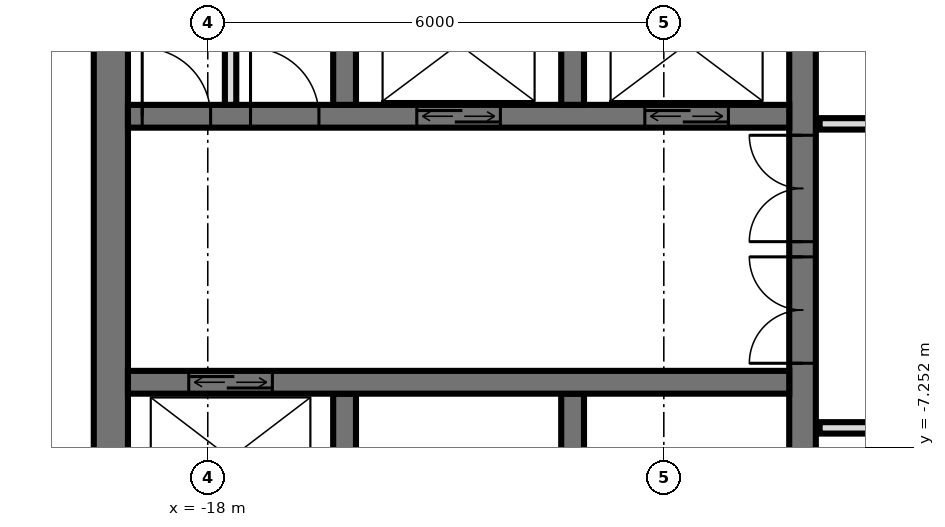
"""IFC4 building model, lengths in metres.
Left out: names, types, materials, properties, quantities, classifications, styles, units other than length and angle.
Written with IfcOpenShell. Run it as: python <this file> out.ifc"""

import sys

from ifc_helpers import new_model, si_unit, direction, frame, frame_2d, origin, place, context, subcontext, project, spatial, rectangle, extrude, element, fill, save


model = new_model("IFC4")
c1 = context("Model", 3, precision=1e-05, world=origin(), true_north=direction((0.0, 1.0)))
c2 = subcontext(c1, "Body", "Model", "MODEL_VIEW")
j1 = project(units=[si_unit("LENGTHUNIT", "METRE"), si_unit("PLANEANGLEUNIT", "RADIAN")], contexts=[c1])
p1 = place(None, origin())
s1 = spatial("IfcSite", under=j1, at=p1, CompositionType="ELEMENT")
p2 = place(p1, origin())
s2 = spatial("IfcBuilding", under=s1, at=p2, CompositionType="ELEMENT")
p3 = place(p2, frame((0.0, 0.0, 330.6)))
s3 = spatial("IfcBuildingStorey", under=s2, at=p3, CompositionType="ELEMENT", Elevation=330.6)
p4 = place(p3, frame((-10.175, -14.55, 0.0), z_axis=(0.0, 0.0, 1.0), x_axis=(0.0, 1.0, 0.0)))
e1 = element("IfcWall", 1, at=p4, inside=s3, PredefinedType="SHEAR", context=c2, shape_type="SweptSolid", body=[
    extrude(rectangle(XDim=14.1, YDim=0.35, at=frame_2d((7.05, 0.0))), origin(), (0.0, 0.0, 1.0), 4.0),
])
p5 = place(p4, frame((8.4, 0.0, 0.0)))
e2 = element("IfcOpeningElement", 2, at=p5, cuts=e1, PredefinedType="OPENING", context=c2, shape_type="SweptSolid", body=[
    extrude(rectangle(XDim=1.4, YDim=2.4, at=frame_2d((0.7, 1.2))), frame((0.0, 0.185, 0.0), z_axis=(0.0, -1.0, 0.0), x_axis=(1.0, 0.0, 0.0)), (0.0, 0.0, 1.0), 0.37),
])
p6 = place(p4, frame((10.0, 0.0, 0.0)))
e3 = element("IfcOpeningElement", 3, at=p6, cuts=e1, PredefinedType="OPENING", context=c2, shape_type="SweptSolid", body=[
    extrude(rectangle(XDim=1.4, YDim=2.4, at=frame_2d((0.7, 1.2))), frame((0.0, 0.185, 0.0), z_axis=(0.0, -1.0, 0.0), x_axis=(1.0, 0.0, 0.0)), (0.0, 0.0, 1.0), 0.37),
])
p7 = place(p4, frame((4.0, 0.0, 0.0)))
e4 = element("IfcOpeningElement", 4, at=p7, cuts=e1, PredefinedType="OPENING", context=c2, shape_type="SweptSolid", body=[
    extrude(rectangle(XDim=1.2, YDim=2.1, at=frame_2d((0.6, 1.05))), frame((0.0, 0.185, 0.0), z_axis=(0.0, -1.0, 0.0), x_axis=(1.0, 0.0, 0.0)), (0.0, 0.0, 1.0), 0.37),
])
p8 = place(p3, frame((-19.275, -14.55, 0.0), z_axis=(0.0, 0.0, 1.0), x_axis=(0.0, 1.0, 0.0)))
e5 = element("IfcWall", 5, at=p8, inside=s3, PredefinedType="SHEAR", context=c2, shape_type="SweptSolid", body=[
    extrude(rectangle(XDim=14.1, YDim=0.45, at=frame_2d((7.05, 0.0))), origin(), (0.0, 0.0, 1.0), 4.0),
])
p9 = place(p3, frame((-19.05, -2.9, 0.0), z_axis=(0.0, 0.0, 1.0), x_axis=(1.0, 0.0, 0.0)))
e6 = element("IfcWall", 6, at=p9, inside=s3, PredefinedType="SHEAR", context=c2, shape_type="SweptSolid", body=[
    extrude(rectangle(XDim=8.7, YDim=0.3, at=frame_2d((4.35, 0.0))), origin(), (0.0, 0.0, 1.0), 4.0),
])
p10 = place(p9, frame((6.8, 0.0, 0.0)))
e7 = element("IfcOpeningElement", 7, at=p10, cuts=e6, PredefinedType="OPENING", context=c2, shape_type="SweptSolid", body=[
    extrude(rectangle(XDim=1.1, YDim=2.1, at=frame_2d((0.55, 1.05))), frame((0.0, 0.16, 0.0), z_axis=(0.0, -1.0, 0.0), x_axis=(1.0, 0.0, 0.0)), (0.0, 0.0, 1.0), 0.32),
])
p11 = place(p9, frame((3.8, 0.0, 0.0)))
e8 = element("IfcOpeningElement", 8, at=p11, cuts=e6, PredefinedType="OPENING", context=c2, shape_type="SweptSolid", body=[
    extrude(rectangle(XDim=1.1, YDim=2.1, at=frame_2d((0.55, 1.05))), frame((0.0, 0.16, 0.0), z_axis=(0.0, -1.0, 0.0), x_axis=(1.0, 0.0, 0.0)), (0.0, 0.0, 1.0), 0.32),
])
p12 = place(p9, frame((1.613, 0.0, 0.0)))
e9 = element("IfcOpeningElement", 9, at=p12, cuts=e6, PredefinedType="OPENING", context=c2, shape_type="SweptSolid", body=[
    extrude(rectangle(XDim=0.9, YDim=2.1, at=frame_2d((0.45, 1.05))), frame((0.0, 0.16, 0.0), z_axis=(0.0, -1.0, 0.0), x_axis=(1.0, 0.0, 0.0)), (0.0, 0.0, 1.0), 0.32),
])
p13 = place(p9, frame((0.188, 0.0, 0.0)))
e10 = element("IfcOpeningElement", 10, at=p13, cuts=e6, PredefinedType="OPENING", context=c2, shape_type="SweptSolid", body=[
    extrude(rectangle(XDim=0.9, YDim=2.1, at=frame_2d((0.45, 1.05))), frame((0.0, 0.16, 0.0), z_axis=(0.0, -1.0, 0.0), x_axis=(1.0, 0.0, 0.0)), (0.0, 0.0, 1.0), 0.32),
])
p14 = place(p3, frame((-19.05, -6.4, 0.0), z_axis=(0.0, 0.0, 1.0), x_axis=(1.0, 0.0, 0.0)))
e11 = element("IfcWall", 11, at=p14, inside=s3, PredefinedType="SHEAR", context=c2, shape_type="SweptSolid", body=[
    extrude(rectangle(XDim=8.7, YDim=0.3, at=frame_2d((4.35, 0.0))), origin(), (0.0, 0.0, 1.0), 4.0),
])
p15 = place(p14, frame((0.8, 0.0, 0.0)))
e12 = element("IfcOpeningElement", 12, at=p15, cuts=e11, PredefinedType="OPENING", context=c2, shape_type="SweptSolid", body=[
    extrude(rectangle(XDim=1.1, YDim=2.1, at=frame_2d((0.55, 1.05))), frame((0.0, 0.16, 0.0), z_axis=(0.0, -1.0, 0.0), x_axis=(1.0, 0.0, 0.0)), (0.0, 0.0, 1.0), 0.32),
])
for number, where, z_axis, x_axis in (
    (13, (-13.2, -2.75, 0.0), (0.0, 0.0, 1.0), (0.0, 1.0, 0.0)),
    (14, (-13.2, -8.85, 0.0), (0.0, 0.0, 1.0), (0.0, 1.0, 0.0)),
    (15, (-16.2, -2.75, 0.0), (0.0, 0.0, 1.0), (0.0, 1.0, 0.0)),
    (16, (-16.2, -8.85, 0.0), (0.0, 0.0, 1.0), (0.0, 1.0, 0.0)),
):
    element("IfcWall", number, at=place(p3, frame(where, z_axis=z_axis, x_axis=x_axis)), inside=s3, PredefinedType="SHEAR", context=c2, shape_type="SweptSolid", body=[
        extrude(rectangle(XDim=2.3, YDim=0.3, at=frame_2d((1.15, 0.0))), origin(), (0.0, 0.0, 1.0), 4.0),
    ])
p16 = place(p3, frame((-17.7, -2.75, 0.0), z_axis=(0.0, 0.0, 1.0), x_axis=(0.0, 1.0, 0.0)))
e17 = element("IfcWall", 17, at=p16, inside=s3, PredefinedType="PARTITIONING", context=c2, shape_type="SweptSolid", body=[
    extrude(rectangle(XDim=2.3, YDim=0.15, at=frame_2d((1.15, 0.0))), origin(), (0.0, 0.0, 1.0), 3.7),
])
p17 = place(p3, frame((-9.95, -7.0, 0.0), z_axis=(0.0, 0.0, 1.0), x_axis=(1.0, 0.0, 0.0)))
e18 = element("IfcWall", 18, at=p17, inside=s3, PredefinedType="PARTITIONING", context=c2, shape_type="SweptSolid", body=[
    extrude(rectangle(XDim=19.9, YDim=0.15, at=frame_2d((9.95, 0.0))), origin(), (0.0, 0.0, 1.0), 3.72),
])
p18 = place(p17, frame((9.45, 0.0, 0.0)))
e19 = element("IfcOpeningElement", 19, at=p18, cuts=e18, PredefinedType="OPENING", context=c2, shape_type="SweptSolid", body=[
    extrude(rectangle(XDim=1.0, YDim=2.1, at=frame_2d((0.5, 1.05))), frame((0.0, 0.085, 0.0), z_axis=(0.0, -1.0, 0.0), x_axis=(1.0, 0.0, 0.0)), (0.0, 0.0, 1.0), 0.17),
])
p19 = place(p17, frame((16.7, 0.0, 0.0)))
e20 = element("IfcOpeningElement", 20, at=p19, cuts=e18, PredefinedType="OPENING", context=c2, shape_type="SweptSolid", body=[
    extrude(rectangle(XDim=1.0, YDim=2.1, at=frame_2d((0.5, 1.05))), frame((0.0, 0.085, 0.0), z_axis=(0.0, -1.0, 0.0), x_axis=(1.0, 0.0, 0.0)), (0.0, 0.0, 1.0), 0.17),
])
p20 = place(p3, frame((-9.95, -3.0, 0.0), z_axis=(0.0, 0.0, 1.0), x_axis=(1.0, 0.0, 0.0)))
e21 = element("IfcWall", 21, at=p20, inside=s3, PredefinedType="PARTITIONING", context=c2, shape_type="SweptSolid", body=[
    extrude(rectangle(XDim=19.9, YDim=0.15, at=frame_2d((9.95, 0.0))), origin(), (0.0, 0.0, 1.0), 3.72),
])
p21 = place(p20, frame((2.2, 0.0, 0.0)))
e22 = element("IfcOpeningElement", 22, at=p21, cuts=e21, PredefinedType="OPENING", context=c2, shape_type="SweptSolid", body=[
    extrude(rectangle(XDim=1.0, YDim=2.1, at=frame_2d((0.5, 1.05))), frame((0.0, 0.085, 0.0), z_axis=(0.0, -1.0, 0.0), x_axis=(1.0, 0.0, 0.0)), (0.0, 0.0, 1.0), 0.17),
])
p22 = place(p20, frame((7.2, 0.0, 0.0)))
e23 = element("IfcOpeningElement", 23, at=p22, cuts=e21, PredefinedType="OPENING", context=c2, shape_type="SweptSolid", body=[
    extrude(rectangle(XDim=1.0, YDim=2.1, at=frame_2d((0.5, 1.05))), frame((0.0, 0.085, 0.0), z_axis=(0.0, -1.0, 0.0), x_axis=(1.0, 0.0, 0.0)), (0.0, 0.0, 1.0), 0.17),
])
p23 = place(p20, frame((11.7, 0.0, 0.0)))
e24 = element("IfcOpeningElement", 24, at=p23, cuts=e21, PredefinedType="OPENING", context=c2, shape_type="SweptSolid", body=[
    extrude(rectangle(XDim=1.0, YDim=2.1, at=frame_2d((0.5, 1.05))), frame((0.0, 0.085, 0.0), z_axis=(0.0, -1.0, 0.0), x_axis=(1.0, 0.0, 0.0)), (0.0, 0.0, 1.0), 0.17),
])
p24 = place(p20, frame((15.45, 0.0, 0.0)))
e25 = element("IfcOpeningElement", 25, at=p24, cuts=e21, PredefinedType="OPENING", context=c2, shape_type="SweptSolid", body=[
    extrude(rectangle(XDim=1.0, YDim=2.1, at=frame_2d((0.5, 1.05))), frame((0.0, 0.085, 0.0), z_axis=(0.0, -1.0, 0.0), x_axis=(1.0, 0.0, 0.0)), (0.0, 0.0, 1.0), 0.17),
])
p25 = place(p20, frame((18.2, 0.0, 0.0)))
e26 = element("IfcOpeningElement", 26, at=p25, cuts=e21, PredefinedType="OPENING", context=c2, shape_type="SweptSolid", body=[
    extrude(rectangle(XDim=1.0, YDim=2.1, at=frame_2d((0.5, 1.05))), frame((0.0, 0.085, 0.0), z_axis=(0.0, -1.0, 0.0), x_axis=(1.0, 0.0, 0.0)), (0.0, 0.0, 1.0), 0.17),
])
p26 = place(p10, origin())
e27 = element("IfcDoor", 27, at=p26, inside=s3, OperationType="DOUBLE_DOOR_SLIDING", PredefinedType="USERDEFINED", context=c2, shape_type="SweptSolid", body=[
    extrude(rectangle(XDim=1.1, YDim=2.1, at=frame_2d((0.55, 1.05))), frame((0.0, 0.025, 0.0), z_axis=(0.0, -1.0, 0.0), x_axis=(1.0, 0.0, 0.0)), (0.0, 0.0, 1.0), 0.05),
])
fill(e7, e27)
p27 = place(p11, origin())
e28 = element("IfcDoor", 28, at=p27, inside=s3, OperationType="DOUBLE_DOOR_SLIDING", PredefinedType="USERDEFINED", context=c2, shape_type="SweptSolid", body=[
    extrude(rectangle(XDim=1.1, YDim=2.1, at=frame_2d((0.55, 1.05))), frame((0.0, 0.025, 0.0), z_axis=(0.0, -1.0, 0.0), x_axis=(1.0, 0.0, 0.0)), (0.0, 0.0, 1.0), 0.05),
])
fill(e8, e28)
p28 = place(p15, origin())
e29 = element("IfcDoor", 29, at=p28, inside=s3, OperationType="DOUBLE_DOOR_SLIDING", PredefinedType="USERDEFINED", context=c2, shape_type="SweptSolid", body=[
    extrude(rectangle(XDim=1.1, YDim=2.1, at=frame_2d((0.55, 1.05))), frame((0.0, 0.025, 0.0), z_axis=(0.0, -1.0, 0.0), x_axis=(1.0, 0.0, 0.0)), (0.0, 0.0, 1.0), 0.05),
])
fill(e12, e29)
p29 = place(p5, origin())
e30 = element("IfcDoor", 30, at=p29, inside=s3, OperationType="DOUBLE_DOOR_SINGLE_SWING", PredefinedType="DOOR", context=c2, shape_type="SweptSolid", body=[
    extrude(rectangle(XDim=1.4, YDim=2.4, at=frame_2d((0.7, 1.2))), frame((0.0, 0.025, 0.0), z_axis=(0.0, -1.0, 0.0), x_axis=(1.0, 0.0, 0.0)), (0.0, 0.0, 1.0), 0.05),
])
fill(e2, e30)
p30 = place(p6, origin())
e31 = element("IfcDoor", 31, at=p30, inside=s3, OperationType="DOUBLE_DOOR_SINGLE_SWING", PredefinedType="DOOR", context=c2, shape_type="SweptSolid", body=[
    extrude(rectangle(XDim=1.4, YDim=2.4, at=frame_2d((0.7, 1.2))), frame((0.0, 0.025, 0.0), z_axis=(0.0, -1.0, 0.0), x_axis=(1.0, 0.0, 0.0)), (0.0, 0.0, 1.0), 0.05),
])
fill(e3, e31)
p31 = place(p12, origin())
e32 = element("IfcDoor", 32, at=p31, inside=s3, OperationType="SINGLE_SWING_RIGHT", PredefinedType="DOOR", context=c2, shape_type="SweptSolid", body=[
    extrude(rectangle(XDim=0.9, YDim=2.1, at=frame_2d((0.45, 1.05))), frame((0.0, 0.025, 0.0), z_axis=(0.0, -1.0, 0.0), x_axis=(1.0, 0.0, 0.0)), (0.0, 0.0, 1.0), 0.05),
])
fill(e9, e32)
p32 = place(p13, origin())
e33 = element("IfcDoor", 33, at=p32, inside=s3, OperationType="SINGLE_SWING_RIGHT", PredefinedType="DOOR", context=c2, shape_type="SweptSolid", body=[
    extrude(rectangle(XDim=0.9, YDim=2.1, at=frame_2d((0.45, 1.05))), frame((0.0, 0.025, 0.0), z_axis=(0.0, -1.0, 0.0), x_axis=(1.0, 0.0, 0.0)), (0.0, 0.0, 1.0), 0.05),
])
fill(e10, e33)
save(model, sys.argv[1])
